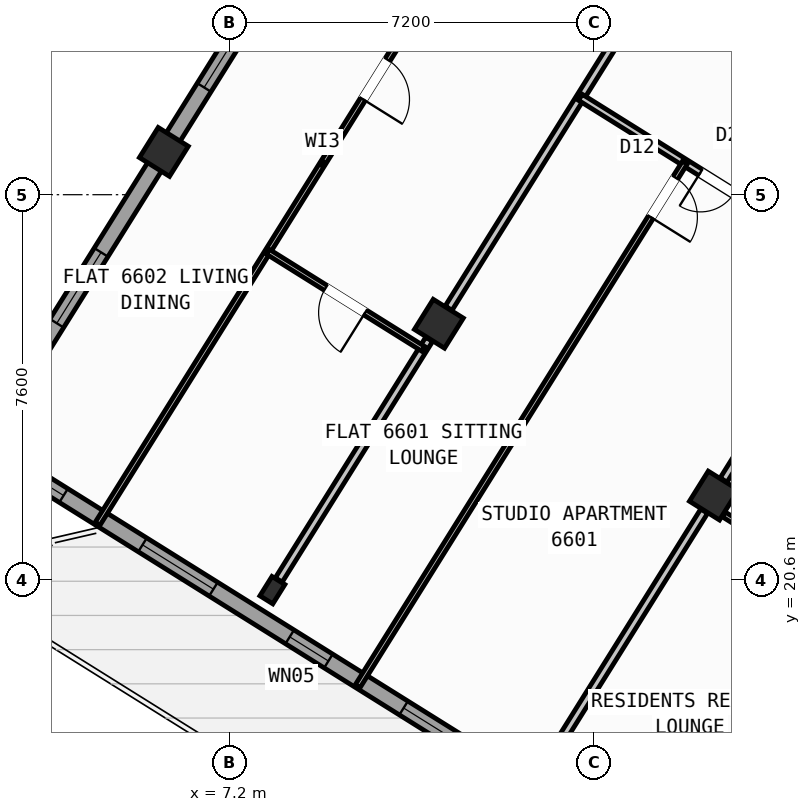
"""IFC4 building model, lengths in metres.
Left out: names, types, materials, properties, quantities, classifications, styles, units other than length and angle.
Written with IfcOpenShell. Run it as: python <this file> out.ifc"""

import sys

from ifc_helpers import new_model, si_unit, direction, frame, frame_2d, origin, origin_2d, place, context, subcontext, project, spatial, rectangle, hollow_rectangle, i_section, extrude, source, transform, mapped, element, fill, save


model = new_model("IFC4")
c1 = context("Model", 3, precision=1e-05, world=origin(), true_north=direction((0.0, 1.0)))
c2 = subcontext(c1, "Body", "Model", "MODEL_VIEW")
j1 = project(units=[si_unit("LENGTHUNIT", "METRE"), si_unit("PLANEANGLEUNIT", "RADIAN")], contexts=[c1])
p1 = place(None, origin())
s1 = spatial("IfcSite", under=j1, at=p1, CompositionType="ELEMENT")
p2 = place(p1, origin())
s2 = spatial("IfcBuilding", under=s1, at=p2, CompositionType="ELEMENT")
p3 = place(p2, frame((0.0, 0.0, 262.8)))
s3 = spatial("IfcBuildingStorey", under=s2, at=p3, CompositionType="ELEMENT", Elevation=262.8)
m1 = source(origin(), c2, "Body", "SweptSolid", [
    extrude(hollow_rectangle(XDim=0.7, YDim=0.7, WallThickness=0.028, at=origin_2d()), origin(), (0.0, 0.0, 1.0), 3.6),
])
for number, where, z_axis, x_axis in (
    (1, (16.764, 22.261, 0.0), (0.0, 0.0, 1.0), (-0.848, 0.53, 0.0)),
    (2, (11.336, 25.653, 0.0), (0.0, 0.0, 1.0), (-0.848, 0.53, 0.0)),
):
    element("IfcColumn", number, at=place(p3, frame(where, z_axis=z_axis, x_axis=x_axis)), inside=s3, PredefinedType="COLUMN", context=c2, shape_type="MappedRepresentation", body=[
        mapped(m1, transform((0.0, 0.0, 0.0), scale=1.0)),
    ])
m2 = source(origin(), c2, "Body", "SweptSolid", [
    extrude(i_section(OverallWidth=0.3, OverallDepth=0.45, WebThickness=0.014, FlangeThickness=0.026, at=origin_2d()), origin(), (0.0, 0.0, 1.0), 3.6),
])
p4 = place(p3, frame((8.051, 20.395, 0.0), z_axis=(0.0, 0.0, 1.0), x_axis=(-0.848048096156, 0.529919264233, 0.0)))
e3 = element("IfcColumn", 3, at=p4, inside=s3, PredefinedType="COLUMN", context=c2, shape_type="MappedRepresentation", body=[
    mapped(m2, transform((0.0, 0.0, 0.0), scale=1.0)),
])
p5 = place(p3, frame((5.909, 29.044, 0.0), z_axis=(0.0, 0.0, 1.0), x_axis=(-0.848048096156, 0.529919264233, 0.0)))
e4 = element("IfcColumn", 4, at=p5, inside=s3, PredefinedType="COLUMN", context=c2, shape_type="MappedRepresentation", body=[
    mapped(m1, transform((0.0, 0.0, 0.0), scale=1.0)),
])
p6 = place(p3, frame((29.268, 6.429, 0.0), z_axis=(0.0, 0.0, 1.0), x_axis=(-0.848049971435, 0.529916263149, 0.0)))
e5 = element("IfcWall", 5, at=p6, inside=s3, PredefinedType="STANDARD", context=c2, shape_type="SweptSolid", body=[
    extrude(rectangle(XDim=31.588, YDim=0.32, at=frame_2d((15.794, 0.0))), origin(), (0.0, 0.0, 1.0), 3.35),
])
p7 = place(p6, frame((16.362, 0.0, 0.0)))
e6 = element("IfcOpeningElement", 6, at=p7, cuts=e5, PredefinedType="OPENING", context=c2, shape_type="SweptSolid", body=[
    extrude(rectangle(XDim=1.2, YDim=2.15, at=frame_2d((0.6, 1.075))), frame((0.0, 0.17, 0.0), z_axis=(0.0, -1.0, 0.0), x_axis=(1.0, 0.0, 0.0)), (0.0, 0.0, 1.0), 0.34),
])
p8 = place(p6, frame((3.859, 0.0, 0.9)))
e7 = element("IfcOpeningElement", 7, at=p8, cuts=e5, PredefinedType="OPENING", context=c2, shape_type="SweptSolid", body=[
    extrude(rectangle(XDim=1.65, YDim=1.45, at=frame_2d((0.825, 0.725))), frame((0.0, 0.17, 0.0), z_axis=(0.0, -1.0, 0.0), x_axis=(1.0, 0.0, 0.0)), (0.0, 0.0, 1.0), 0.34),
])
p9 = place(p6, frame((10.519, 0.0, 0.9)))
e8 = element("IfcOpeningElement", 8, at=p9, cuts=e5, PredefinedType="OPENING", context=c2, shape_type="SweptSolid", body=[
    extrude(rectangle(XDim=1.65, YDim=1.45, at=frame_2d((0.825, 0.725))), frame((0.0, 0.17, 0.0), z_axis=(0.0, -1.0, 0.0), x_axis=(1.0, 0.0, 0.0)), (0.0, 0.0, 1.0), 0.34),
])
p10 = place(p6, frame((20.015, 0.0, 0.95)))
e9 = element("IfcOpeningElement", 9, at=p10, cuts=e5, PredefinedType="OPENING", context=c2, shape_type="SweptSolid", body=[
    extrude(rectangle(XDim=1.95, YDim=1.35, at=frame_2d((0.975, 0.675))), frame((0.0, 0.17, 0.0), z_axis=(0.0, -1.0, 0.0), x_axis=(1.0, 0.0, 0.0)), (0.0, 0.0, 1.0), 0.34),
])
p11 = place(p6, frame((23.715, 0.0, 1.0)))
e10 = element("IfcOpeningElement", 10, at=p11, cuts=e5, PredefinedType="OPENING", context=c2, shape_type="SweptSolid", body=[
    extrude(rectangle(XDim=0.9, YDim=1.25, at=frame_2d((0.45, 0.625))), frame((0.0, 0.17, 0.0), z_axis=(0.0, -1.0, 0.0), x_axis=(1.0, 0.0, 0.0)), (0.0, 0.0, 1.0), 0.34),
])
p12 = place(p6, frame((26.391, 0.0, 0.9)))
e11 = element("IfcOpeningElement", 11, at=p12, cuts=e5, PredefinedType="OPENING", context=c2, shape_type="SweptSolid", body=[
    extrude(rectangle(XDim=1.65, YDim=1.45, at=frame_2d((0.825, 0.725))), frame((0.0, 0.17, 0.0), z_axis=(0.0, -1.0, 0.0), x_axis=(1.0, 0.0, 0.0)), (0.0, 0.0, 1.0), 0.34),
])
p13 = place(p6, frame((29.878, 0.0, 1.0)))
e12 = element("IfcOpeningElement", 12, at=p13, cuts=e5, PredefinedType="OPENING", context=c2, shape_type="SweptSolid", body=[
    extrude(rectangle(XDim=0.9, YDim=1.25, at=frame_2d((0.45, 0.625))), frame((0.0, 0.17, 0.0), z_axis=(0.0, -1.0, 0.0), x_axis=(1.0, 0.0, 0.0)), (0.0, 0.0, 1.0), 0.34),
])
p14 = place(p3, frame((2.415, 23.452, 0.0), z_axis=(0.0, 0.0, 1.0), x_axis=(0.52991049553, 0.848053575387, 0.0)))
e13 = element("IfcWall", 13, at=p14, inside=s3, PredefinedType="STANDARD", context=c2, shape_type="SweptSolid", body=[
    extrude(rectangle(XDim=21.587, YDim=0.32, at=frame_2d((10.794, 0.0))), origin(), (0.0, 0.0, 1.0), 2.875),
])
p15 = place(p14, frame((2.606, 0.0, 0.9)))
e14 = element("IfcOpeningElement", 14, at=p15, cuts=e13, PredefinedType="OPENING", context=c2, shape_type="SweptSolid", body=[
    extrude(rectangle(XDim=1.65, YDim=1.45, at=frame_2d((0.825, 0.725))), frame((0.0, 0.17, 0.0), z_axis=(0.0, -1.0, 0.0), x_axis=(1.0, 0.0, 0.0)), (0.0, 0.0, 1.0), 0.34),
])
p16 = place(p14, frame((8.094, 0.0, 0.9)))
e15 = element("IfcOpeningElement", 15, at=p16, cuts=e13, PredefinedType="OPENING", context=c2, shape_type="SweptSolid", body=[
    extrude(rectangle(XDim=1.35, YDim=1.45, at=frame_2d((0.675, 0.725))), frame((0.0, 0.17, 0.0), z_axis=(0.0, -1.0, 0.0), x_axis=(1.0, 0.0, 0.0)), (0.0, 0.0, 1.0), 0.34),
])
p17 = place(p14, frame((11.044, 0.0, 0.9)))
e16 = element("IfcOpeningElement", 16, at=p17, cuts=e13, PredefinedType="OPENING", context=c2, shape_type="SweptSolid", body=[
    extrude(rectangle(XDim=1.35, YDim=1.45, at=frame_2d((0.675, 0.725))), frame((0.0, 0.17, 0.0), z_axis=(0.0, -1.0, 0.0), x_axis=(1.0, 0.0, 0.0)), (0.0, 0.0, 1.0), 0.34),
])
p18 = place(p14, frame((14.804, 0.0, 1.0)))
e17 = element("IfcOpeningElement", 17, at=p18, cuts=e13, PredefinedType="OPENING", context=c2, shape_type="SweptSolid", body=[
    extrude(rectangle(XDim=0.9, YDim=1.25, at=frame_2d((0.45, 0.625))), frame((0.0, 0.17, 0.0), z_axis=(0.0, -1.0, 0.0), x_axis=(1.0, 0.0, 0.0)), (0.0, 0.0, 1.0), 0.34),
])
p19 = place(p14, frame((19.384, 0.0, 1.0)))
e18 = element("IfcOpeningElement", 18, at=p19, cuts=e13, PredefinedType="OPENING", context=c2, shape_type="SweptSolid", body=[
    extrude(rectangle(XDim=0.9, YDim=1.25, at=frame_2d((0.45, 0.625))), frame((0.0, 0.17, 0.0), z_axis=(0.0, -1.0, 0.0), x_axis=(1.0, 0.0, 0.0)), (0.0, 0.0, 1.0), 0.34),
])
p20 = place(p3, frame((14.138, 41.825, 0.0), z_axis=(0.0, 0.0, 1.0), x_axis=(0.848046498049, -0.529921821731, 0.0)))
e19 = element("IfcWall", 19, at=p20, inside=s3, PredefinedType="STANDARD", context=c2, shape_type="SweptSolid", body=[
    extrude(rectangle(XDim=31.588, YDim=0.32, at=frame_2d((15.794, 0.0))), origin(), (0.0, 0.0, 1.0), 3.35),
])
p21 = place(p20, frame((3.568, 0.0, 0.0)))
e20 = element("IfcOpeningElement", 20, at=p21, cuts=e19, PredefinedType="OPENING", context=c2, shape_type="SweptSolid", body=[
    extrude(rectangle(XDim=1.05, YDim=2.15, at=frame_2d((0.525, 1.075))), frame((0.0, 0.17, 0.0), z_axis=(0.0, -1.0, 0.0), x_axis=(1.0, 0.0, 0.0)), (0.0, 0.0, 1.0), 0.34),
])
p22 = place(p20, frame((1.046, 0.0, 0.9)))
e21 = element("IfcOpeningElement", 21, at=p22, cuts=e19, PredefinedType="OPENING", context=c2, shape_type="SweptSolid", body=[
    extrude(rectangle(XDim=1.65, YDim=1.45, at=frame_2d((0.825, 0.725))), frame((0.0, 0.17, 0.0), z_axis=(0.0, -1.0, 0.0), x_axis=(1.0, 0.0, 0.0)), (0.0, 0.0, 1.0), 0.34),
])
p23 = place(p20, frame((8.61, 0.0, 0.9)))
e22 = element("IfcOpeningElement", 22, at=p23, cuts=e19, PredefinedType="OPENING", context=c2, shape_type="SweptSolid", body=[
    extrude(rectangle(XDim=1.35, YDim=1.45, at=frame_2d((0.675, 0.725))), frame((0.0, 0.17, 0.0), z_axis=(0.0, -1.0, 0.0), x_axis=(1.0, 0.0, 0.0)), (0.0, 0.0, 1.0), 0.34),
])
p24 = place(p20, frame((13.599, 0.0, 0.95)))
e23 = element("IfcOpeningElement", 23, at=p24, cuts=e19, PredefinedType="OPENING", context=c2, shape_type="SweptSolid", body=[
    extrude(rectangle(XDim=1.95, YDim=1.35, at=frame_2d((0.975, 0.675))), frame((0.0, 0.17, 0.0), z_axis=(0.0, -1.0, 0.0), x_axis=(1.0, 0.0, 0.0)), (0.0, 0.0, 1.0), 0.34),
])
p25 = place(p20, frame((17.154, 0.0, 1.0)))
e24 = element("IfcOpeningElement", 24, at=p25, cuts=e19, PredefinedType="OPENING", context=c2, shape_type="SweptSolid", body=[
    extrude(rectangle(XDim=0.9, YDim=1.25, at=frame_2d((0.45, 0.625))), frame((0.0, 0.17, 0.0), z_axis=(0.0, -1.0, 0.0), x_axis=(1.0, 0.0, 0.0)), (0.0, 0.0, 1.0), 0.34),
])
p26 = place(p20, frame((21.719, 0.0, 0.9)))
e25 = element("IfcOpeningElement", 25, at=p26, cuts=e19, PredefinedType="OPENING", context=c2, shape_type="SweptSolid", body=[
    extrude(rectangle(XDim=1.65, YDim=1.45, at=frame_2d((0.825, 0.725))), frame((0.0, 0.17, 0.0), z_axis=(0.0, -1.0, 0.0), x_axis=(1.0, 0.0, 0.0)), (0.0, 0.0, 1.0), 0.34),
])
p27 = place(p20, frame((27.419, 0.0, 0.9)))
e26 = element("IfcOpeningElement", 26, at=p27, cuts=e19, PredefinedType="OPENING", context=c2, shape_type="SweptSolid", body=[
    extrude(rectangle(XDim=1.65, YDim=1.45, at=frame_2d((0.825, 0.725))), frame((0.0, 0.17, 0.0), z_axis=(0.0, -1.0, 0.0), x_axis=(1.0, 0.0, 0.0)), (0.0, 0.0, 1.0), 0.34),
])
p28 = place(p3, frame((25.198, 28.606, 0.0), z_axis=(0.0, 0.0, 1.0), x_axis=(-0.529921796515, -0.848046513806, 0.0)))
e27 = element("IfcWall", 27, at=p28, inside=s3, PredefinedType="PARTITIONING", context=c2, shape_type="SweptSolid", body=[
    extrude(rectangle(XDim=16.5, YDim=0.16, at=frame_2d((8.25, 0.0))), origin(), (0.0, 0.0, 1.0), 3.34),
])
p29 = place(p3, frame((26.363, 30.472, 0.0), z_axis=(0.0, 0.0, 1.0), x_axis=(-0.848052408131, 0.529912363569, 0.0)))
e28 = element("IfcWall", 28, at=p29, inside=s3, PredefinedType="PARTITIONING", context=c2, shape_type="SweptSolid", body=[
    extrude(rectangle(XDim=16.73, YDim=0.16, at=frame_2d((8.365, 0.0))), origin(), (0.0, 0.0, 1.0), 3.34),
])
p30 = place(p29, frame((1.588, 0.0, 0.0)))
e29 = element("IfcOpeningElement", 29, at=p30, cuts=e28, PredefinedType="OPENING", context=c2, shape_type="SweptSolid", body=[
    extrude(rectangle(XDim=1.0, YDim=2.1, at=frame_2d((0.5, 1.05))), frame((0.0, 0.09, 0.0), z_axis=(0.0, -1.0, 0.0), x_axis=(1.0, 0.0, 0.0)), (0.0, 0.0, 1.0), 0.18),
])
p31 = place(p29, frame((6.685, 0.0, 0.0)))
e30 = element("IfcOpeningElement", 30, at=p31, cuts=e28, PredefinedType="OPENING", context=c2, shape_type="SweptSolid", body=[
    extrude(rectangle(XDim=1.0, YDim=2.1, at=frame_2d((0.5, 1.05))), frame((0.0, 0.09, 0.0), z_axis=(0.0, -1.0, 0.0), x_axis=(1.0, 0.0, 0.0)), (0.0, 0.0, 1.0), 0.18),
])
p32 = place(p29, frame((12.951, 0.0, 0.0)))
e31 = element("IfcOpeningElement", 31, at=p32, cuts=e28, PredefinedType="OPENING", context=c2, shape_type="SweptSolid", body=[
    extrude(rectangle(XDim=1.0, YDim=2.1, at=frame_2d((0.5, 1.05))), frame((0.0, 0.09, 0.0), z_axis=(0.0, -1.0, 0.0), x_axis=(1.0, 0.0, 0.0)), (0.0, 0.0, 1.0), 0.18),
])
p33 = place(p3, frame((25.198, 28.606, 0.0), z_axis=(0.0, 0.0, 1.0), x_axis=(-0.848052408131, 0.529912363569, 0.0)))
e32 = element("IfcWall", 32, at=p33, inside=s3, PredefinedType="PARTITIONING", context=c2, shape_type="SweptSolid", body=[
    extrude(rectangle(XDim=16.73, YDim=0.16, at=frame_2d((8.365, 0.0))), origin(), (0.0, 0.0, 1.0), 3.34),
])
p34 = place(p33, frame((1.395, 0.0, 0.0)))
e33 = element("IfcOpeningElement", 33, at=p34, cuts=e32, PredefinedType="OPENING", context=c2, shape_type="SweptSolid", body=[
    extrude(rectangle(XDim=1.0, YDim=2.1, at=frame_2d((0.5, 1.05))), frame((0.0, 0.09, 0.0), z_axis=(0.0, -1.0, 0.0), x_axis=(1.0, 0.0, 0.0)), (0.0, 0.0, 1.0), 0.18),
])
p35 = place(p33, frame((7.82, 0.0, 0.0)))
e34 = element("IfcOpeningElement", 34, at=p35, cuts=e32, PredefinedType="OPENING", context=c2, shape_type="SweptSolid", body=[
    extrude(rectangle(XDim=1.0, YDim=2.1, at=frame_2d((0.5, 1.05))), frame((0.0, 0.09, 0.0), z_axis=(0.0, -1.0, 0.0), x_axis=(1.0, 0.0, 0.0)), (0.0, 0.0, 1.0), 0.18),
])
p36 = place(p33, frame((14.76, 0.0, 0.0)))
e35 = element("IfcOpeningElement", 35, at=p36, cuts=e32, PredefinedType="OPENING", context=c2, shape_type="SweptSolid", body=[
    extrude(rectangle(XDim=1.0, YDim=2.1, at=frame_2d((0.5, 1.05))), frame((0.0, 0.09, 0.0), z_axis=(0.0, -1.0, 0.0), x_axis=(1.0, 0.0, 0.0)), (0.0, 0.0, 1.0), 0.18),
])
p37 = place(p3, frame((20.44, 28.145, 0.0), z_axis=(0.0, 0.0, 1.0), x_axis=(-0.529938869374, -0.84803584519, 0.0)))
e36 = element("IfcWall", 36, at=p37, inside=s3, PredefinedType="PARTITIONING", context=c2, shape_type="SweptSolid", body=[
    extrude(rectangle(XDim=6.576, YDim=0.16, at=frame_2d((3.288, 0.0))), origin(), (0.0, 0.0, 1.0), 2.875),
])
p38 = place(p3, frame((16.572, 21.954, 0.0), z_axis=(0.0, 0.0, 1.0), x_axis=(-0.529904903214, -0.848057069748, 0.0)))
e37 = element("IfcWall", 37, at=p38, inside=s3, PredefinedType="PARTITIONING", context=c2, shape_type="SweptSolid", body=[
    extrude(rectangle(XDim=5.601, YDim=0.16, at=frame_2d((2.801, 0.0))), origin(), (0.0, 0.0, 1.0), 2.875),
])
p39 = place(p3, frame((19.865, 20.073, 0.0), z_axis=(0.0, 0.0, 1.0), x_axis=(-0.84807831592, 0.529870899433, 0.0)))
e38 = element("IfcWall", 38, at=p39, inside=s3, PredefinedType="PARTITIONING", context=c2, shape_type="SweptSolid", body=[
    extrude(rectangle(XDim=3.428, YDim=0.11, at=frame_2d((1.714, 0.0))), origin(), (0.0, 0.0, 1.0), 2.875),
])
p40 = place(p39, frame((1.435, 0.0, 0.0)))
e39 = element("IfcOpeningElement", 39, at=p40, cuts=e38, PredefinedType="OPENING", context=c2, shape_type="SweptSolid", body=[
    extrude(rectangle(XDim=0.92, YDim=2.08, at=frame_2d((0.46, 1.04))), frame((0.0, 0.065, 0.0), z_axis=(0.0, -1.0, 0.0), x_axis=(1.0, 0.0, 0.0)), (0.0, 0.0, 1.0), 0.13),
])
p41 = place(p3, frame((15.013, 31.537, 0.0), z_axis=(0.0, 0.0, 1.0), x_axis=(-0.529922185033, -0.848046271031, 0.0)))
e40 = element("IfcWall", 40, at=p41, inside=s3, PredefinedType="PARTITIONING", context=c2, shape_type="SweptSolid", body=[
    extrude(rectangle(XDim=6.576, YDim=0.16, at=frame_2d((3.288, 0.0))), origin(), (0.0, 0.0, 1.0), 2.875),
])
p42 = place(p3, frame((11.144, 25.346, 0.0), z_axis=(0.0, 0.0, 1.0), x_axis=(-0.529904903214, -0.848057069748, 0.0)))
e41 = element("IfcWall", 41, at=p42, inside=s3, PredefinedType="PARTITIONING", context=c2, shape_type="SweptSolid", body=[
    extrude(rectangle(XDim=5.601, YDim=0.16, at=frame_2d((2.801, 0.0))), origin(), (0.0, 0.0, 1.0), 2.875),
])
p43 = place(p3, frame((19.556, 26.73, 0.0), z_axis=(0.0, 0.0, 1.0), x_axis=(-0.848049732085, 0.529916646191, 0.0)))
e42 = element("IfcWall", 42, at=p43, inside=s3, PredefinedType="PLUMBINGWALL", context=c2, shape_type="SweptSolid", body=[
    extrude(rectangle(XDim=6.4, YDim=0.14, at=frame_2d((3.2, 0.0))), origin(), (0.0, 0.0, 1.0), 3.34),
])
p44 = place(p43, frame((2.824, 0.0, 0.0)))
e43 = element("IfcOpeningElement", 43, at=p44, cuts=e42, PredefinedType="OPENING", context=c2, shape_type="SweptSolid", body=[
    extrude(rectangle(XDim=0.78, YDim=2.05, at=frame_2d((0.39, 1.025))), frame((0.0, 0.08, 0.0), z_axis=(0.0, -1.0, 0.0), x_axis=(1.0, 0.0, 0.0)), (0.0, 0.0, 1.0), 0.16),
])
p45 = place(p3, frame((16.191, 28.833, 0.0), z_axis=(0.0, 0.0, 1.0), x_axis=(-0.529921526101, -0.84804668278, 0.0)))
e44 = element("IfcWall", 44, at=p45, inside=s3, PredefinedType="PARTITIONING", context=c2, shape_type="SweptSolid", body=[
    extrude(rectangle(XDim=12.19, YDim=0.11, at=frame_2d((6.095, 0.0))), origin(), (0.0, 0.0, 1.0), 3.34),
])
p46 = place(p45, frame((0.35, 0.0, 0.0)))
e45 = element("IfcOpeningElement", 45, at=p46, cuts=e44, PredefinedType="OPENING", context=c2, shape_type="SweptSolid", body=[
    extrude(rectangle(XDim=0.92, YDim=2.08, at=frame_2d((0.46, 1.04))), frame((0.0, 0.065, 0.0), z_axis=(0.0, -1.0, 0.0), x_axis=(1.0, 0.0, 0.0)), (0.0, 0.0, 1.0), 0.13),
])
p47 = place(p3, frame((13.486, 35.924, 0.0), z_axis=(0.0, 0.0, 1.0), x_axis=(-0.529920421309, -0.848047373134, 0.0)))
e46 = element("IfcWall", 46, at=p47, inside=s3, PredefinedType="PARTITIONING", context=c2, shape_type="SweptSolid", body=[
    extrude(rectangle(XDim=16.77, YDim=0.11, at=frame_2d((8.385, 0.0))), origin(), (0.0, 0.0, 1.0), 3.34),
])
p48 = place(p47, frame((0.76, 0.0, 0.0)))
e47 = element("IfcOpeningElement", 47, at=p48, cuts=e46, PredefinedType="OPENING", context=c2, shape_type="SweptSolid", body=[
    extrude(rectangle(XDim=0.78, YDim=2.05, at=frame_2d((0.39, 1.025))), frame((0.0, 0.065, 0.0), z_axis=(0.0, -1.0, 0.0), x_axis=(1.0, 0.0, 0.0)), (0.0, 0.0, 1.0), 0.13),
])
p49 = place(p47, frame((5.967, 0.0, 0.0)))
e48 = element("IfcOpeningElement", 48, at=p49, cuts=e46, PredefinedType="OPENING", context=c2, shape_type="SweptSolid", body=[
    extrude(rectangle(XDim=0.92, YDim=2.08, at=frame_2d((0.46, 1.04))), frame((0.0, 0.065, 0.0), z_axis=(0.0, -1.0, 0.0), x_axis=(1.0, 0.0, 0.0)), (0.0, 0.0, 1.0), 0.13),
])
p50 = place(p3, frame((11.027, 25.158, 0.0), z_axis=(0.0, 0.0, 1.0), x_axis=(-0.848051346257, 0.52991406295, 0.0)))
e49 = element("IfcWall", 49, at=p50, inside=s3, PredefinedType="PARTITIONING", context=c2, shape_type="SweptSolid", body=[
    extrude(rectangle(XDim=3.62, YDim=0.11, at=frame_2d((1.81, 0.0))), origin(), (0.0, 0.0, 1.0), 3.34),
])
p51 = place(p50, frame((1.35, 0.0, 0.0)))
e50 = element("IfcOpeningElement", 50, at=p51, cuts=e49, PredefinedType="OPENING", context=c2, shape_type="SweptSolid", body=[
    extrude(rectangle(XDim=0.92, YDim=2.08, at=frame_2d((0.46, 1.04))), frame((0.0, 0.065, 0.0), z_axis=(0.0, -1.0, 0.0), x_axis=(1.0, 0.0, 0.0)), (0.0, 0.0, 1.0), 0.13),
])
m3 = source(origin(), c2, "Body", "SweptSolid", [
    extrude(rectangle(XDim=1.95, YDim=1.35, at=frame_2d((0.975, 0.675))), frame((0.0, 0.03, 0.0), z_axis=(0.0, -1.0, 0.0), x_axis=(1.0, 0.0, 0.0)), (0.0, 0.0, 1.0), 0.06),
])
p52 = place(p10, origin())
e51 = element("IfcWindow", 51, at=p52, inside=s3, PartitioningType="SINGLE_PANEL", PredefinedType="WINDOW", context=c2, shape_type="MappedRepresentation", body=[
    mapped(m3, transform((0.0, 0.0, 0.0), scale=1.0)),
])
fill(e9, e51)
m4 = source(origin(), c2, "Body", "SweptSolid", [
    extrude(rectangle(XDim=0.9, YDim=1.25, at=frame_2d((0.45, 0.625))), frame((0.0, 0.03, 0.0), z_axis=(0.0, -1.0, 0.0), x_axis=(1.0, 0.0, 0.0)), (0.0, 0.0, 1.0), 0.06),
])
p53 = place(p11, origin())
e52 = element("IfcWindow", 52, at=p53, inside=s3, PartitioningType="SINGLE_PANEL", PredefinedType="WINDOW", context=c2, shape_type="MappedRepresentation", body=[
    mapped(m4, transform((0.0, 0.0, 0.0), scale=1.0)),
])
fill(e10, e52)
m5 = source(origin(), c2, "Body", "SweptSolid", [
    extrude(rectangle(XDim=1.65, YDim=1.45, at=frame_2d((0.825, 0.725))), frame((0.0, 0.03, 0.0), z_axis=(0.0, -1.0, 0.0), x_axis=(1.0, 0.0, 0.0)), (0.0, 0.0, 1.0), 0.06),
])
p54 = place(p12, origin())
e53 = element("IfcWindow", 53, at=p54, inside=s3, PartitioningType="SINGLE_PANEL", PredefinedType="WINDOW", context=c2, shape_type="MappedRepresentation", body=[
    mapped(m5, transform((0.0, 0.0, 0.0), scale=1.0)),
])
fill(e11, e53)
p55 = place(p13, origin())
e54 = element("IfcWindow", 54, at=p55, inside=s3, PartitioningType="SINGLE_PANEL", PredefinedType="WINDOW", context=c2, shape_type="MappedRepresentation", body=[
    mapped(m4, transform((0.0, 0.0, 0.0), scale=1.0)),
])
fill(e12, e54)
p56 = place(p15, origin())
e55 = element("IfcWindow", 55, at=p56, inside=s3, PartitioningType="SINGLE_PANEL", PredefinedType="WINDOW", context=c2, shape_type="MappedRepresentation", body=[
    mapped(m5, transform((0.0, 0.0, 0.0), scale=1.0)),
])
fill(e14, e55)
m6 = source(origin(), c2, "Body", "SweptSolid", [
    extrude(rectangle(XDim=1.35, YDim=1.45, at=frame_2d((0.675, 0.725))), frame((0.0, 0.03, 0.0), z_axis=(0.0, -1.0, 0.0), x_axis=(1.0, 0.0, 0.0)), (0.0, 0.0, 1.0), 0.06),
])
p57 = place(p16, origin())
e56 = element("IfcWindow", 56, at=p57, inside=s3, PartitioningType="SINGLE_PANEL", PredefinedType="WINDOW", context=c2, shape_type="MappedRepresentation", body=[
    mapped(m6, transform((0.0, 0.0, 0.0), scale=1.0)),
])
fill(e15, e56)
m7 = source(origin(), c2, "Body", "SweptSolid", [
    extrude(rectangle(XDim=0.92, YDim=2.08, at=frame_2d((0.46, 1.04))), frame((0.0, 0.025, 0.0), z_axis=(0.0, -1.0, 0.0), x_axis=(1.0, 0.0, 0.0)), (0.0, 0.0, 1.0), 0.05),
])
p58 = place(p46, origin())
e57 = element("IfcDoor", 57, at=p58, inside=s3, OperationType="SINGLE_SWING_RIGHT", PredefinedType="DOOR", context=c2, shape_type="MappedRepresentation", body=[
    mapped(m7, transform((0.0, 0.0, 0.0), scale=1.0)),
])
fill(e45, e57)
m8 = source(origin(), c2, "Body", "SweptSolid", [
    extrude(rectangle(XDim=0.78, YDim=2.05, at=frame_2d((0.39, 1.025))), frame((0.0, 0.025, 0.0), z_axis=(0.0, -1.0, 0.0), x_axis=(1.0, 0.0, 0.0)), (0.0, 0.0, 1.0), 0.05),
])
p59 = place(p44, origin())
e58 = element("IfcDoor", 58, at=p59, inside=s3, OperationType="SINGLE_SWING_RIGHT", PredefinedType="DOOR", context=c2, shape_type="MappedRepresentation", body=[
    mapped(m8, transform((0.0, 0.0, 0.0), scale=1.0)),
])
fill(e43, e58)
p60 = place(p49, origin())
e59 = element("IfcDoor", 59, at=p60, inside=s3, OperationType="SINGLE_SWING_RIGHT", PredefinedType="DOOR", context=c2, shape_type="MappedRepresentation", body=[
    mapped(m7, transform((0.0, 0.0, 0.0), scale=1.0)),
])
fill(e48, e59)
p61 = place(p51, origin())
e60 = element("IfcDoor", 60, at=p61, inside=s3, OperationType="SINGLE_SWING_LEFT", PredefinedType="DOOR", context=c2, shape_type="MappedRepresentation", body=[
    mapped(m7, transform((0.0, 0.0, 0.0), scale=1.0)),
])
fill(e50, e60)
save(model, sys.argv[1])
